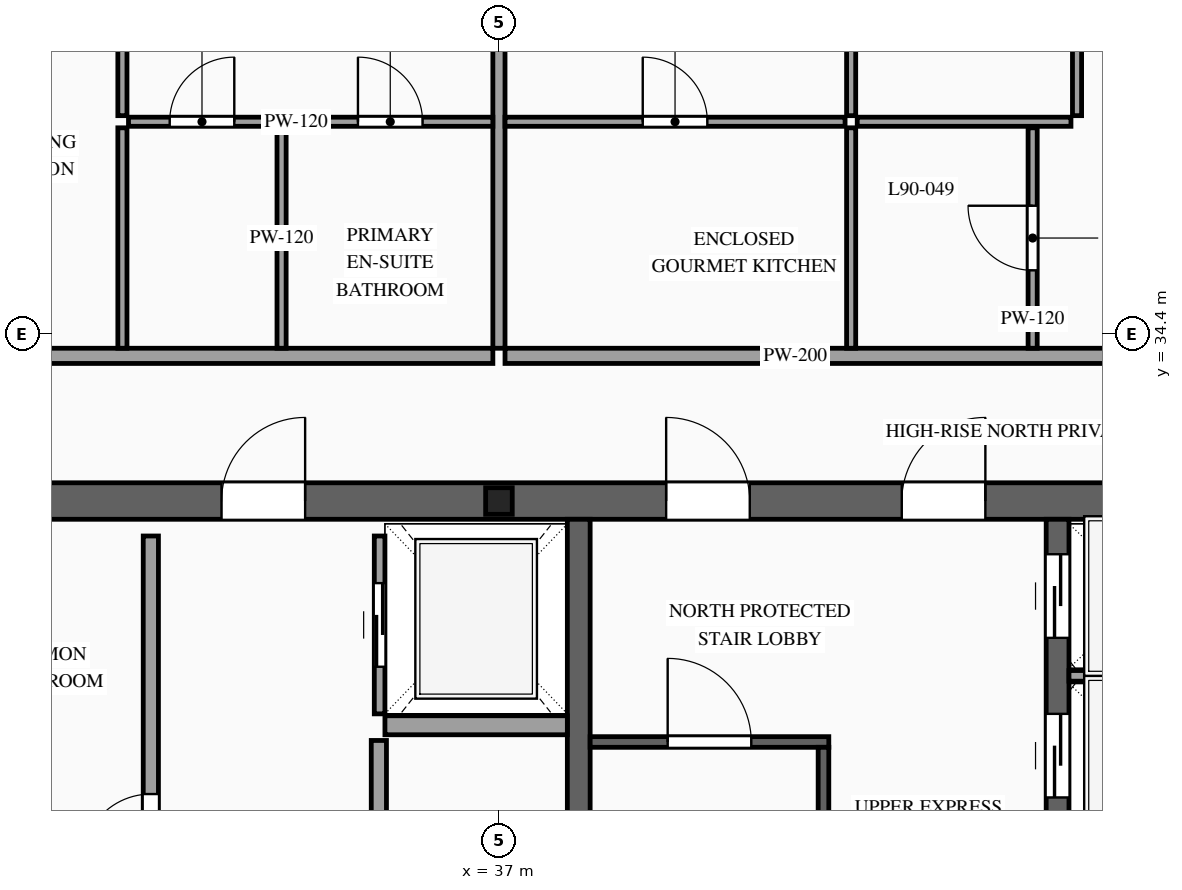
"""IFC4 building model, lengths in metres.
Left out: names, types, materials, properties, quantities, classifications, styles, units other than length and angle.
Written with IfcOpenShell. Run it as: python <this file> out.ifc"""

import sys

from ifc_helpers import new_model, si_unit, direction, frame, frame_2d, origin, origin_2d, place, context, subcontext, project, spatial, rectangle, i_section, extrude, source, transform, mapped, element, fill, save


model = new_model("IFC4")
c1 = context("Model", 3, precision=1e-05, world=origin(), true_north=direction((0.0, 1.0)))
c2 = subcontext(c1, "Body", "Model", "MODEL_VIEW")
j1 = project(units=[si_unit("LENGTHUNIT", "METRE"), si_unit("PLANEANGLEUNIT", "RADIAN")], contexts=[c1])
p1 = place(None, origin())
s1 = spatial("IfcSite", under=j1, at=p1, CompositionType="ELEMENT")
p2 = place(p1, origin())
s2 = spatial("IfcBuilding", under=s1, at=p2, CompositionType="ELEMENT")
p3 = place(p2, frame((0.0, 0.0, 335.7)))
s3 = spatial("IfcBuildingStorey", under=s2, at=p3, CompositionType="ELEMENT", Elevation=335.7)
p4 = place(p3, frame((23.56, 32.2, 0.0), z_axis=(0.0, 0.0, 1.0), x_axis=(1.0, 0.0, 0.0)))
e1 = element("IfcWall", 1, at=p4, inside=s3, PredefinedType="SHEAR", context=c2, shape_type="SweptSolid", body=[
    extrude(rectangle(XDim=26.88, YDim=0.48, at=frame_2d((13.44, 0.0))), origin(), (0.0, 0.0, 1.0), 3.5),
])
p5 = place(p4, frame((4.51, 0.0, 0.0)))
e2 = element("IfcOpeningElement", 2, at=p5, cuts=e1, PredefinedType="OPENING", context=c2, shape_type="SweptSolid", body=[
    extrude(rectangle(XDim=0.9, YDim=2.15, at=frame_2d((0.45, 1.075))), frame((0.0, 0.255, 0.0), z_axis=(0.0, -1.0, 0.0), x_axis=(1.0, 0.0, 0.0)), (0.0, 0.0, 1.0), 0.51),
])
p6 = place(p4, frame((9.79, 0.0, 0.0)))
e3 = element("IfcOpeningElement", 3, at=p6, cuts=e1, PredefinedType="OPENING", context=c2, shape_type="SweptSolid", body=[
    extrude(rectangle(XDim=1.1, YDim=2.2, at=frame_2d((0.55, 1.1))), frame((0.0, 0.255, 0.0), z_axis=(0.0, -1.0, 0.0), x_axis=(1.0, 0.0, 0.0)), (0.0, 0.0, 1.0), 0.51),
])
p7 = place(p4, frame((15.64, 0.0, 0.0)))
e4 = element("IfcOpeningElement", 4, at=p7, cuts=e1, PredefinedType="OPENING", context=c2, shape_type="SweptSolid", body=[
    extrude(rectangle(XDim=1.1, YDim=2.2, at=frame_2d((0.55, 1.1))), frame((0.0, 0.255, 0.0), z_axis=(0.0, -1.0, 0.0), x_axis=(1.0, 0.0, 0.0)), (0.0, 0.0, 1.0), 0.51),
])
p8 = place(p4, frame((18.74, 0.0, 0.0)))
e5 = element("IfcOpeningElement", 5, at=p8, cuts=e1, PredefinedType="OPENING", context=c2, shape_type="SweptSolid", body=[
    extrude(rectangle(XDim=1.1, YDim=2.2, at=frame_2d((0.55, 1.1))), frame((0.0, 0.255, 0.0), z_axis=(0.0, -1.0, 0.0), x_axis=(1.0, 0.0, 0.0)), (0.0, 0.0, 1.0), 0.51),
])
m1 = source(origin(), c2, "Body", "SweptSolid", [
    extrude(rectangle(XDim=12.32, YDim=0.3, at=frame_2d((6.16, 0.0))), origin(), (0.0, 0.0, 1.0), 3.5),
])
p9 = place(p3, frame((38.05, 19.64, 0.0), z_axis=(0.0, 0.0, 1.0), x_axis=(0.0, 1.0, 0.0)))
e6 = element("IfcWall", 6, at=p9, inside=s3, PredefinedType="SOLIDWALL", context=c2, shape_type="MappedRepresentation", body=[
    mapped(m1, transform((0.0, 0.0, 0.0), scale=1.0)),
])
p10 = place(p3, frame((44.35, 19.64, 0.0), z_axis=(0.0, 0.0, 1.0), x_axis=(0.0, 1.0, 0.0)))
e7 = element("IfcWall", 7, at=p10, inside=s3, PredefinedType="SOLIDWALL", context=c2, shape_type="SweptSolid", body=[
    extrude(rectangle(XDim=12.32, YDim=0.3, at=frame_2d((6.16, 0.0))), origin(), (0.0, 0.0, 1.0), 3.5),
])
p11 = place(p10, frame((6.56, 0.0, 0.0)))
e8 = element("IfcOpeningElement", 8, at=p11, cuts=e7, PredefinedType="OPENING", context=c2, shape_type="SweptSolid", body=[
    extrude(rectangle(XDim=1.1, YDim=2.2, at=frame_2d((0.55, 1.1))), frame((0.0, 0.165, 0.0), z_axis=(0.0, -1.0, 0.0), x_axis=(1.0, 0.0, 0.0)), (0.0, 0.0, 1.0), 0.33),
])
p12 = place(p10, frame((8.66, 0.0, 0.0)))
e9 = element("IfcOpeningElement", 9, at=p12, cuts=e7, PredefinedType="OPENING", context=c2, shape_type="SweptSolid", body=[
    extrude(rectangle(XDim=1.1, YDim=2.2, at=frame_2d((0.55, 1.1))), frame((0.0, 0.165, 0.0), z_axis=(0.0, -1.0, 0.0), x_axis=(1.0, 0.0, 0.0)), (0.0, 0.0, 1.0), 0.33),
])
p13 = place(p10, frame((10.76, 0.0, 0.0)))
e10 = element("IfcOpeningElement", 10, at=p13, cuts=e7, PredefinedType="OPENING", context=c2, shape_type="SweptSolid", body=[
    extrude(rectangle(XDim=1.1, YDim=2.2, at=frame_2d((0.55, 1.1))), frame((0.0, 0.165, 0.0), z_axis=(0.0, -1.0, 0.0), x_axis=(1.0, 0.0, 0.0)), (0.0, 0.0, 1.0), 0.33),
])
m2 = source(origin(), c2, "Body", "SweptSolid", [
    extrude(i_section(OverallWidth=0.35, OverallDepth=0.35, WebThickness=0.012, FlangeThickness=0.019, at=origin_2d()), origin(), (0.0, 0.0, 1.0), 3.5),
])
p14 = place(p3, frame((37.0, 32.2, 0.0), z_axis=(0.0, 0.0, 1.0), x_axis=(1.0, 0.0, 0.0)))
e11 = element("IfcColumn", 11, at=p14, inside=s3, PredefinedType="COLUMN", context=c2, shape_type="MappedRepresentation", body=[
    mapped(m2, transform((0.0, 0.0, 0.0), scale=1.0)),
])
p15 = place(p3, frame((35.43, 29.4, 0.0), z_axis=(0.0, 0.0, 1.0), x_axis=(0.0, 1.0, 0.0)))
e12 = element("IfcWall", 12, at=p15, inside=s3, PredefinedType="SOLIDWALL", context=c2, shape_type="SweptSolid", body=[
    extrude(rectangle(XDim=2.34, YDim=0.14, at=frame_2d((1.17, 0.0))), origin(), (0.0, 0.0, 1.0), 3.26),
])
p16 = place(p15, frame((0.62, 0.0, 0.0)))
e13 = element("IfcOpeningElement", 13, at=p16, cuts=e12, PredefinedType="OPENING", context=c2, shape_type="SweptSolid", body=[
    extrude(rectangle(XDim=1.1, YDim=2.2, at=frame_2d((0.55, 1.1))), frame((0.0, 0.085, 0.0), z_axis=(0.0, -1.0, 0.0), x_axis=(1.0, 0.0, 0.0)), (0.0, 0.0, 1.0), 0.17),
])
m3 = source(origin(), c2, "Body", "SweptSolid", [
    extrude(rectangle(XDim=2.4, YDim=0.25, at=frame_2d((1.2, 0.0))), origin(), (0.0, 0.0, 1.0), 3.26),
])
p17 = place(p3, frame((35.5, 29.25, 0.0), z_axis=(0.0, 0.0, 1.0), x_axis=(1.0, 0.0, 0.0)))
e14 = element("IfcWall", 14, at=p17, inside=s3, PredefinedType="SOLIDWALL", context=c2, shape_type="MappedRepresentation", body=[
    mapped(m3, transform((0.0, 0.0, 0.0), scale=1.0)),
])
m4 = source(origin(), c2, "Body", "SweptSolid", [
    extrude(rectangle(XDim=2.0, YDim=0.14, at=frame_2d((1.0, 0.0))), origin(), (0.0, 0.0, 1.0), 3.26),
])
p18 = place(p3, frame((44.5, 29.9, 0.0), z_axis=(0.0, 0.0, 1.0), x_axis=(1.0, 0.0, 0.0)))
e15 = element("IfcWall", 15, at=p18, inside=s3, PredefinedType="SOLIDWALL", context=c2, shape_type="MappedRepresentation", body=[
    mapped(m4, transform((0.0, 0.0, 0.0), scale=1.0)),
])
p19 = place(p3, frame((38.2, 29.03, 0.0), z_axis=(0.0, 0.0, 1.0), x_axis=(1.0, 0.0, 0.0)))
e16 = element("IfcWall", 16, at=p19, inside=s3, PredefinedType="SOLIDWALL", context=c2, shape_type="SweptSolid", body=[
    extrude(rectangle(XDim=3.14, YDim=0.14, at=frame_2d((1.57, 0.0))), origin(), (0.0, 0.0, 1.0), 3.26),
])
p20 = place(p19, frame((1.02, 0.0, 0.0)))
e17 = element("IfcOpeningElement", 17, at=p20, cuts=e16, PredefinedType="OPENING", context=c2, shape_type="SweptSolid", body=[
    extrude(rectangle(XDim=1.1, YDim=2.2, at=frame_2d((0.55, 1.1))), frame((0.0, 0.085, 0.0), z_axis=(0.0, -1.0, 0.0), x_axis=(1.0, 0.0, 0.0)), (0.0, 0.0, 1.0), 0.17),
])
m5 = source(origin(), c2, "Body", "SweptSolid", [
    extrude(rectangle(XDim=8.94, YDim=0.14, at=frame_2d((4.47, 0.0))), origin(), (0.0, 0.0, 1.0), 3.26),
])
p21 = place(p3, frame((41.27, 20.02, 0.0), z_axis=(0.0, 0.0, 1.0), x_axis=(0.0, 1.0, 0.0)))
e18 = element("IfcWall", 18, at=p21, inside=s3, PredefinedType="SOLIDWALL", context=c2, shape_type="MappedRepresentation", body=[
    mapped(m5, transform((0.0, 0.0, 0.0), scale=1.0)),
])
p22 = place(p3, frame((32.42, 24.05, 0.0), z_axis=(0.0, 0.0, 1.0), x_axis=(0.0, 1.0, 0.0)))
e19 = element("IfcWall", 19, at=p22, inside=s3, PredefinedType="PARTITIONING", context=c2, shape_type="SweptSolid", body=[
    extrude(rectangle(XDim=7.69, YDim=0.2, at=frame_2d((3.845, 0.0))), origin(), (0.0, 0.0, 1.0), 3.26),
])
p23 = place(p22, frame((3.395, 0.0, 0.0)))
e20 = element("IfcOpeningElement", 20, at=p23, cuts=e19, PredefinedType="OPENING", context=c2, shape_type="SweptSolid", body=[
    extrude(rectangle(XDim=0.9, YDim=2.15, at=frame_2d((0.45, 1.075))), frame((0.0, 0.115, 0.0), z_axis=(0.0, -1.0, 0.0), x_axis=(1.0, 0.0, 0.0)), (0.0, 0.0, 1.0), 0.23),
])
p24 = place(p3, frame((35.42, 19.86, 0.0), z_axis=(0.0, 0.0, 1.0), x_axis=(0.0, 1.0, 0.0)))
e21 = element("IfcWall", 21, at=p24, inside=s3, PredefinedType="PARTITIONING", context=c2, shape_type="SweptSolid", body=[
    extrude(rectangle(XDim=9.19, YDim=0.2, at=frame_2d((4.595, 0.0))), origin(), (0.0, 0.0, 1.0), 3.26),
])
p25 = place(p24, frame((4.145, 0.0, 0.0)))
e22 = element("IfcOpeningElement", 22, at=p25, cuts=e21, PredefinedType="OPENING", context=c2, shape_type="SweptSolid", body=[
    extrude(rectangle(XDim=0.9, YDim=2.15, at=frame_2d((0.45, 1.075))), frame((0.0, 0.115, 0.0), z_axis=(0.0, -1.0, 0.0), x_axis=(1.0, 0.0, 0.0)), (0.0, 0.0, 1.0), 0.23),
])
p26 = place(p3, frame((20.94, 34.11, 0.0), z_axis=(0.0, 0.0, 1.0), x_axis=(1.0, 0.0, 0.0)))
e23 = element("IfcWall", 23, at=p26, inside=s3, PredefinedType="PARTITIONING", context=c2, shape_type="SweptSolid", body=[
    extrude(rectangle(XDim=15.98, YDim=0.2, at=frame_2d((7.99, 0.0))), origin(), (0.0, 0.0, 1.0), 3.26),
])
p27 = place(p26, frame((8.816, 0.0, 0.0)))
e24 = element("IfcOpeningElement", 24, at=p27, cuts=e23, PredefinedType="OPENING", context=c2, shape_type="SweptSolid", body=[
    extrude(rectangle(XDim=1.0, YDim=2.2, at=frame_2d((0.5, 1.1))), frame((0.0, 0.115, 0.0), z_axis=(0.0, -1.0, 0.0), x_axis=(1.0, 0.0, 0.0)), (0.0, 0.0, 1.0), 0.23),
])
m6 = source(origin(), c2, "Body", "SweptSolid", [
    extrude(rectangle(XDim=10.54, YDim=0.16, at=frame_2d((5.27, 0.0))), origin(), (0.0, 0.0, 1.0), 2.767),
])
p28 = place(p3, frame((37.0, 34.21, 0.0), z_axis=(0.0, 0.0, 1.0), x_axis=(0.0, 1.0, 0.0)))
e25 = element("IfcWall", 25, at=p28, inside=s3, PredefinedType="PARTITIONING", context=c2, shape_type="MappedRepresentation", body=[
    mapped(m6, transform((0.0, 0.0, 0.0), scale=1.0)),
])
m7 = source(origin(), c2, "Body", "SweptSolid", [
    extrude(rectangle(XDim=2.9, YDim=0.12, at=frame_2d((1.45, 0.0))), origin(), (0.0, 0.0, 1.0), 3.26),
])
for number, where, z_axis, x_axis in (
    (26, (34.14, 34.21, 0.0), (0.0, 0.0, 1.0), (0.0, 1.0, 0.0)),
    (27, (32.046, 34.21, 0.0), (0.0, 0.0, 1.0), (0.0, 1.0, 0.0)),
):
    element("IfcWall", number, at=place(p3, frame(where, z_axis=z_axis, x_axis=x_axis)), inside=s3, PredefinedType="PARTITIONING", context=c2, shape_type="MappedRepresentation", body=[
        mapped(m7, transform((0.0, 0.0, 0.0), scale=1.0)),
    ])
p29 = place(p3, frame((32.126, 37.19, 0.0), z_axis=(0.0, 0.0, 1.0), x_axis=(1.0, 0.0, 0.0)))
e28 = element("IfcWall", 28, at=p29, inside=s3, PredefinedType="PARTITIONING", context=c2, shape_type="SweptSolid", body=[
    extrude(rectangle(XDim=4.794, YDim=0.12, at=frame_2d((2.397, 0.0))), origin(), (0.0, 0.0, 1.0), 3.26),
])
p30 = place(p29, frame((3.019, 0.0, 0.0)))
e29 = element("IfcOpeningElement", 29, at=p30, cuts=e28, PredefinedType="OPENING", context=c2, shape_type="SweptSolid", body=[
    extrude(rectangle(XDim=0.85, YDim=2.1, at=frame_2d((0.425, 1.05))), frame((0.0, 0.075, 0.0), z_axis=(0.0, -1.0, 0.0), x_axis=(1.0, 0.0, 0.0)), (0.0, 0.0, 1.0), 0.15),
])
p31 = place(p29, frame((0.542, 0.0, 0.0)))
e30 = element("IfcOpeningElement", 30, at=p31, cuts=e28, PredefinedType="OPENING", context=c2, shape_type="SweptSolid", body=[
    extrude(rectangle(XDim=0.85, YDim=2.1, at=frame_2d((0.425, 1.05))), frame((0.0, 0.075, 0.0), z_axis=(0.0, -1.0, 0.0), x_axis=(1.0, 0.0, 0.0)), (0.0, 0.0, 1.0), 0.15),
])
p32 = place(p3, frame((32.046, 37.27, 0.0), z_axis=(0.0, 0.0, 1.0), x_axis=(0.0, 1.0, 0.0)))
e31 = element("IfcWall", 31, at=p32, inside=s3, PredefinedType="PARTITIONING", context=c2, shape_type="SweptSolid", body=[
    extrude(rectangle(XDim=7.48, YDim=0.12, at=frame_2d((3.74, 0.0))), origin(), (0.0, 0.0, 1.0), 3.26),
])
p33 = place(p32, frame((3.29, 0.0, 0.0)))
e32 = element("IfcOpeningElement", 32, at=p33, cuts=e31, PredefinedType="OPENING", context=c2, shape_type="SweptSolid", body=[
    extrude(rectangle(XDim=0.9, YDim=2.15, at=frame_2d((0.45, 1.075))), frame((0.0, 0.075, 0.0), z_axis=(0.0, -1.0, 0.0), x_axis=(1.0, 0.0, 0.0)), (0.0, 0.0, 1.0), 0.15),
])
p34 = place(p3, frame((37.08, 34.11, 0.0), z_axis=(0.0, 0.0, 1.0), x_axis=(1.0, 0.0, 0.0)))
e33 = element("IfcWall", 33, at=p34, inside=s3, PredefinedType="PARTITIONING", context=c2, shape_type="SweptSolid", body=[
    extrude(rectangle(XDim=15.98, YDim=0.2, at=frame_2d((7.99, 0.0))), origin(), (0.0, 0.0, 1.0), 3.26),
])
p35 = place(p34, frame((7.888, 0.0, 0.0)))
e34 = element("IfcOpeningElement", 34, at=p35, cuts=e33, PredefinedType="OPENING", context=c2, shape_type="SweptSolid", body=[
    extrude(rectangle(XDim=1.0, YDim=2.2, at=frame_2d((0.5, 1.1))), frame((0.0, 0.115, 0.0), z_axis=(0.0, -1.0, 0.0), x_axis=(1.0, 0.0, 0.0)), (0.0, 0.0, 1.0), 0.23),
])
p36 = place(p3, frame((37.08, 37.19, 0.0), z_axis=(0.0, 0.0, 1.0), x_axis=(1.0, 0.0, 0.0)))
e35 = element("IfcWall", 35, at=p36, inside=s3, PredefinedType="PARTITIONING", context=c2, shape_type="SweptSolid", body=[
    extrude(rectangle(XDim=4.474, YDim=0.12, at=frame_2d((2.237, 0.0))), origin(), (0.0, 0.0, 1.0), 3.26),
])
p37 = place(p36, frame((1.812, 0.0, 0.0)))
e36 = element("IfcOpeningElement", 36, at=p37, cuts=e35, PredefinedType="OPENING", context=c2, shape_type="SweptSolid", body=[
    extrude(rectangle(XDim=0.85, YDim=2.1, at=frame_2d((0.425, 1.05))), frame((0.0, 0.075, 0.0), z_axis=(0.0, -1.0, 0.0), x_axis=(1.0, 0.0, 0.0)), (0.0, 0.0, 1.0), 0.15),
])
p38 = place(p3, frame((41.634, 34.21, 0.0), z_axis=(0.0, 0.0, 1.0), x_axis=(0.0, 1.0, 0.0)))
e37 = element("IfcWall", 37, at=p38, inside=s3, PredefinedType="PARTITIONING", context=c2, shape_type="MappedRepresentation", body=[
    mapped(m7, transform((0.0, 0.0, 0.0), scale=1.0)),
])
p39 = place(p3, frame((44.022, 34.21, 0.0), z_axis=(0.0, 0.0, 1.0), x_axis=(0.0, 1.0, 0.0)))
e38 = element("IfcWall", 38, at=p39, inside=s3, PredefinedType="PARTITIONING", context=c2, shape_type="SweptSolid", body=[
    extrude(rectangle(XDim=2.9, YDim=0.12, at=frame_2d((1.45, 0.0))), origin(), (0.0, 0.0, 1.0), 3.26),
])
p40 = place(p39, frame((1.025, 0.0, 0.0)))
e39 = element("IfcOpeningElement", 39, at=p40, cuts=e38, PredefinedType="OPENING", context=c2, shape_type="SweptSolid", body=[
    extrude(rectangle(XDim=0.85, YDim=2.1, at=frame_2d((0.425, 1.05))), frame((0.0, 0.075, 0.0), z_axis=(0.0, -1.0, 0.0), x_axis=(1.0, 0.0, 0.0)), (0.0, 0.0, 1.0), 0.15),
])
p41 = place(p3, frame((41.634, 37.27, 0.0), z_axis=(0.0, 0.0, 1.0), x_axis=(0.0, 1.0, 0.0)))
e40 = element("IfcWall", 40, at=p41, inside=s3, PredefinedType="PARTITIONING", context=c2, shape_type="SweptSolid", body=[
    extrude(rectangle(XDim=7.48, YDim=0.12, at=frame_2d((3.74, 0.0))), origin(), (0.0, 0.0, 1.0), 3.26),
])
p42 = place(p41, frame((3.29, 0.0, 0.0)))
e41 = element("IfcOpeningElement", 41, at=p42, cuts=e40, PredefinedType="OPENING", context=c2, shape_type="SweptSolid", body=[
    extrude(rectangle(XDim=0.9, YDim=2.15, at=frame_2d((0.45, 1.075))), frame((0.0, 0.075, 0.0), z_axis=(0.0, -1.0, 0.0), x_axis=(1.0, 0.0, 0.0)), (0.0, 0.0, 1.0), 0.15),
])
m8 = source(origin(), c2, "Body", "SweptSolid", [
    extrude(rectangle(XDim=2.812, YDim=0.12, at=frame_2d((1.406, 0.0))), origin(), (0.0, 0.0, 1.0), 3.26),
])
p43 = place(p3, frame((41.714, 37.19, 0.0), z_axis=(0.0, 0.0, 1.0), x_axis=(1.0, 0.0, 0.0)))
e42 = element("IfcWall", 42, at=p43, inside=s3, PredefinedType="PARTITIONING", context=c2, shape_type="MappedRepresentation", body=[
    mapped(m8, transform((0.0, 0.0, 0.0), scale=1.0)),
])
p44 = place(p3, frame((44.606, 37.27, 0.0), z_axis=(0.0, 0.0, 1.0), x_axis=(0.0, 1.0, 0.0)))
e43 = element("IfcWall", 43, at=p44, inside=s3, PredefinedType="PARTITIONING", context=c2, shape_type="SweptSolid", body=[
    extrude(rectangle(XDim=7.48, YDim=0.12, at=frame_2d((3.74, 0.0))), origin(), (0.0, 0.0, 1.0), 3.26),
])
p45 = place(p44, frame((3.29, 0.0, 0.0)))
e44 = element("IfcOpeningElement", 44, at=p45, cuts=e43, PredefinedType="OPENING", context=c2, shape_type="SweptSolid", body=[
    extrude(rectangle(XDim=0.9, YDim=2.15, at=frame_2d((0.45, 1.075))), frame((0.0, 0.075, 0.0), z_axis=(0.0, -1.0, 0.0), x_axis=(1.0, 0.0, 0.0)), (0.0, 0.0, 1.0), 0.15),
])
m9 = source(origin(), c2, "Body", "SweptSolid", [
    extrude(rectangle(XDim=1.1, YDim=2.2, at=frame_2d((0.55, 1.1))), frame((0.0, 0.025, 0.0), z_axis=(0.0, -1.0, 0.0), x_axis=(1.0, 0.0, 0.0)), (0.0, 0.0, 1.0), 0.05),
])
p46 = place(p16, origin())
e45 = element("IfcDoor", 45, at=p46, inside=s3, OperationType="SLIDING_TO_RIGHT", PredefinedType="DOOR", context=c2, shape_type="MappedRepresentation", body=[
    mapped(m9, transform((0.0, 0.0, 0.0), scale=1.0)),
])
fill(e13, e45)
p47 = place(p12, origin())
e46 = element("IfcDoor", 46, at=p47, inside=s3, OperationType="SLIDING_TO_RIGHT", PredefinedType="DOOR", context=c2, shape_type="MappedRepresentation", body=[
    mapped(m9, transform((0.0, 0.0, 0.0), scale=1.0)),
])
fill(e9, e46)
p48 = place(p13, origin())
e47 = element("IfcDoor", 47, at=p48, inside=s3, OperationType="SLIDING_TO_LEFT", PredefinedType="DOOR", context=c2, shape_type="MappedRepresentation", body=[
    mapped(m9, transform((0.0, 0.0, 0.0), scale=1.0)),
])
fill(e10, e47)
m10 = source(origin(), c2, "Body", "SweptSolid", [
    extrude(rectangle(XDim=1.1, YDim=2.2, at=frame_2d((0.55, 1.1))), frame((0.0, 0.025, 0.0), z_axis=(0.0, -1.0, 0.0), x_axis=(1.0, 0.0, 0.0)), (0.0, 0.0, 1.0), 0.05),
])
p49 = place(p20, origin())
e48 = element("IfcDoor", 48, at=p49, inside=s3, OperationType="SINGLE_SWING_LEFT", PredefinedType="DOOR", context=c2, shape_type="MappedRepresentation", body=[
    mapped(m10, transform((0.0, 0.0, 0.0), scale=1.0)),
])
fill(e17, e48)
p50 = place(p6, origin())
e49 = element("IfcDoor", 49, at=p50, inside=s3, OperationType="SINGLE_SWING_RIGHT", PredefinedType="DOOR", context=c2, shape_type="MappedRepresentation", body=[
    mapped(m10, transform((0.0, 0.0, 0.0), scale=1.0)),
])
fill(e3, e49)
p51 = place(p7, origin())
e50 = element("IfcDoor", 50, at=p51, inside=s3, OperationType="SINGLE_SWING_LEFT", PredefinedType="DOOR", context=c2, shape_type="MappedRepresentation", body=[
    mapped(m10, transform((0.0, 0.0, 0.0), scale=1.0)),
])
fill(e4, e50)
p52 = place(p8, origin())
e51 = element("IfcDoor", 51, at=p52, inside=s3, OperationType="SINGLE_SWING_RIGHT", PredefinedType="DOOR", context=c2, shape_type="MappedRepresentation", body=[
    mapped(m10, transform((0.0, 0.0, 0.0), scale=1.0)),
])
fill(e5, e51)
m11 = source(origin(), c2, "Body", "SweptSolid", [
    extrude(rectangle(XDim=0.9, YDim=2.15, at=frame_2d((0.45, 1.075))), frame((0.0, 0.025, 0.0), z_axis=(0.0, -1.0, 0.0), x_axis=(1.0, 0.0, 0.0)), (0.0, 0.0, 1.0), 0.05),
])
p53 = place(p23, origin())
e52 = element("IfcDoor", 52, at=p53, inside=s3, OperationType="SINGLE_SWING_LEFT", PredefinedType="DOOR", context=c2, shape_type="MappedRepresentation", body=[
    mapped(m11, transform((0.0, 0.0, 0.0), scale=1.0)),
])
fill(e20, e52)
m12 = source(origin(), c2, "Body", "SweptSolid", [
    extrude(rectangle(XDim=0.85, YDim=2.1, at=frame_2d((0.425, 1.05))), frame((0.0, 0.025, 0.0), z_axis=(0.0, -1.0, 0.0), x_axis=(1.0, 0.0, 0.0)), (0.0, 0.0, 1.0), 0.05),
])
p54 = place(p30, origin())
e53 = element("IfcDoor", 53, at=p54, inside=s3, OperationType="SINGLE_SWING_LEFT", PredefinedType="DOOR", context=c2, shape_type="MappedRepresentation", body=[
    mapped(m12, transform((0.0, 0.0, 0.0), scale=1.0)),
])
fill(e29, e53)
p55 = place(p31, origin())
e54 = element("IfcDoor", 54, at=p55, inside=s3, OperationType="SINGLE_SWING_RIGHT", PredefinedType="DOOR", context=c2, shape_type="MappedRepresentation", body=[
    mapped(m12, transform((0.0, 0.0, 0.0), scale=1.0)),
])
fill(e30, e54)
p56 = place(p37, origin())
e55 = element("IfcDoor", 55, at=p56, inside=s3, OperationType="SINGLE_SWING_LEFT", PredefinedType="DOOR", context=c2, shape_type="MappedRepresentation", body=[
    mapped(m12, transform((0.0, 0.0, 0.0), scale=1.0)),
])
fill(e36, e55)
p57 = place(p40, origin())
e56 = element("IfcDoor", 56, at=p57, inside=s3, OperationType="SINGLE_SWING_RIGHT", PredefinedType="DOOR", context=c2, shape_type="MappedRepresentation", body=[
    mapped(m12, transform((0.0, 0.0, 0.0), scale=1.0)),
])
fill(e39, e56)
save(model, sys.argv[1])
